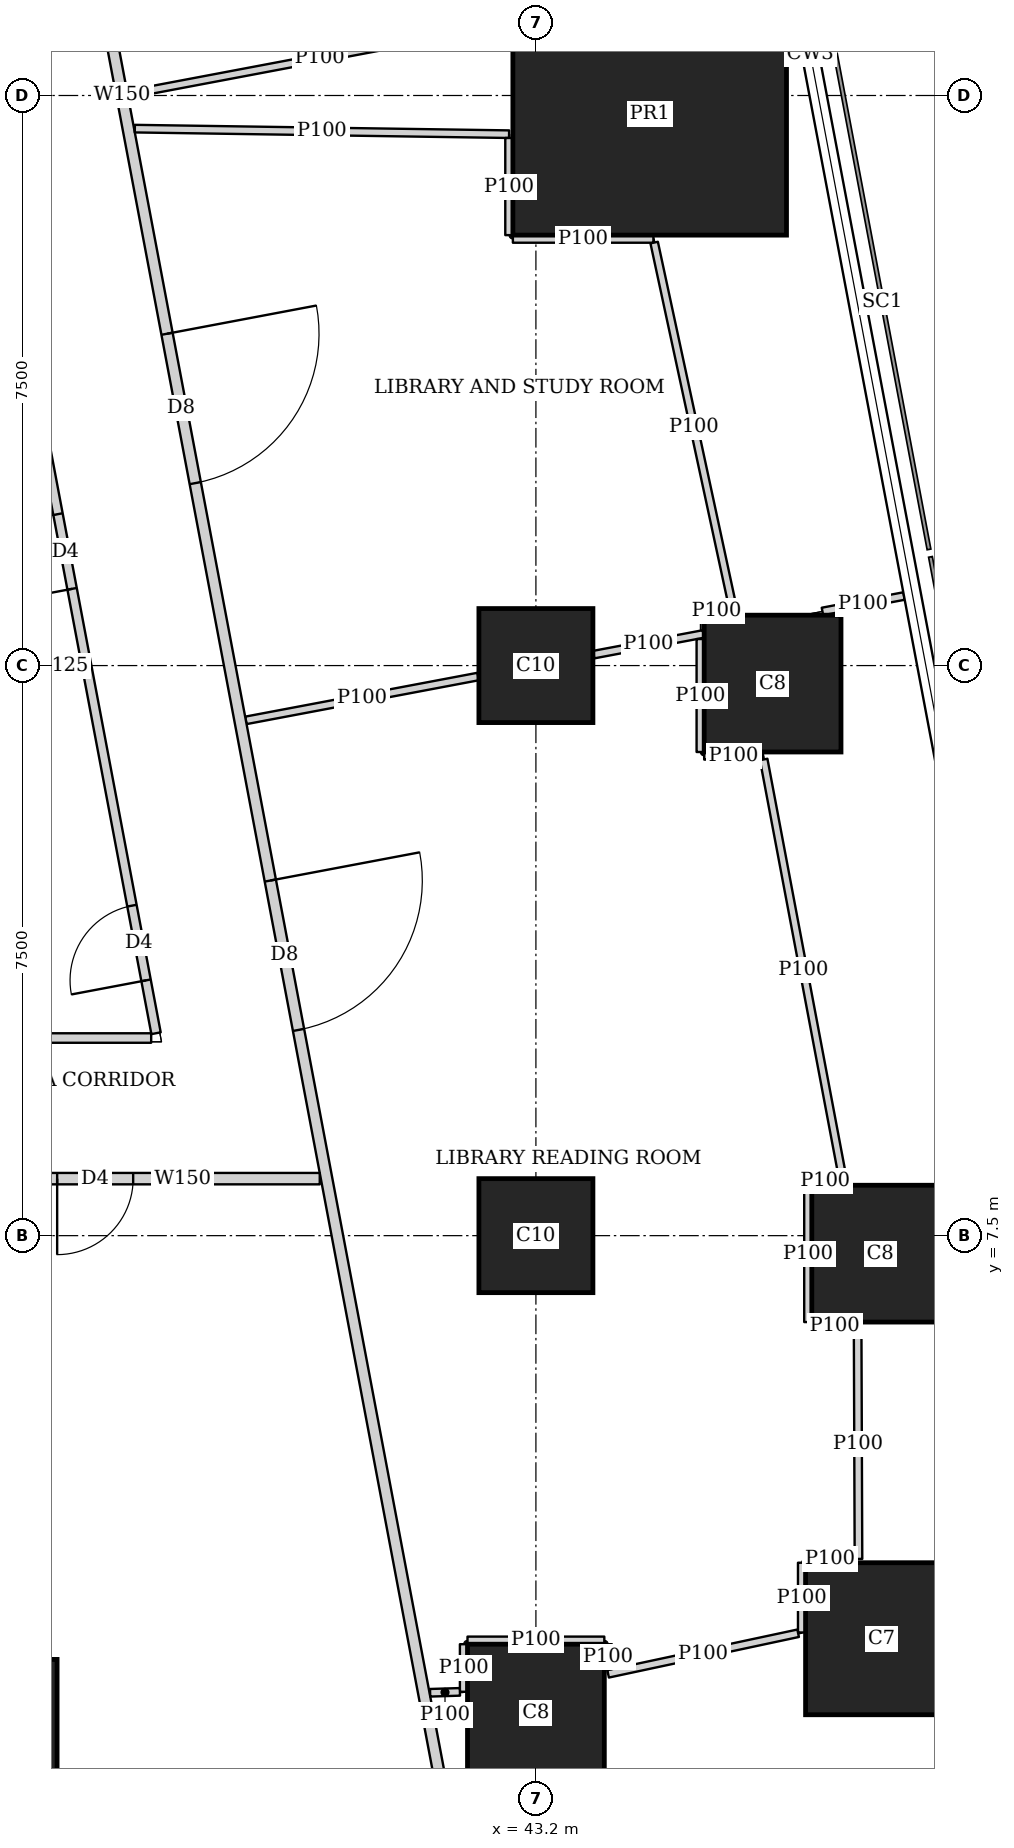
"""IFC4 building model, lengths in metres.
Left out: names, types, materials, properties, quantities, classifications, styles, units other than length and angle.
Written with IfcOpenShell. Run it as: python <this file> out.ifc"""

import sys

from ifc_helpers import new_model, si_unit, direction, frame, frame_2d, origin, origin_2d, place, context, subcontext, project, spatial, rectangle, extrude, element, fill, save


model = new_model("IFC4")
c1 = context("Model", 3, precision=1e-05, world=origin(), true_north=direction((0.0, 1.0)))
c2 = subcontext(c1, "Body", "Model", "MODEL_VIEW")
j1 = project(units=[si_unit("LENGTHUNIT", "METRE"), si_unit("PLANEANGLEUNIT", "RADIAN")], contexts=[c1])
p1 = place(None, origin())
s1 = spatial("IfcSite", under=j1, at=p1, CompositionType="ELEMENT")
p2 = place(p1, origin())
s2 = spatial("IfcBuilding", under=s1, at=p2, CompositionType="ELEMENT")
p3 = place(p2, frame((0.0, 0.0, 188.3)))
s3 = spatial("IfcBuildingStorey", under=s2, at=p3, CompositionType="ELEMENT", Elevation=188.3)
for number, where, z_axis, x_axis in (
    (1, (36.0, 1.025, 0.0), (0.0, 0.0, 1.0), (1.0, 0.0, 0.0)),
    (2, (43.2, 1.225, 0.0), (0.0, 0.0, 1.0), (1.0, 0.0, 0.0)),
):
    element("IfcColumn", number, at=place(p3, frame(where, z_axis=z_axis, x_axis=x_axis)), inside=s3, PredefinedType="COLUMN", context=c2, shape_type="SweptSolid", body=[
        extrude(rectangle(XDim=1.8, YDim=1.8, at=origin_2d()), origin(), (0.0, 0.0, 1.0), 5.4),
    ])
p4 = place(p3, frame((47.748, 2.197, 0.0), z_axis=(0.0, 0.0, 1.0), x_axis=(1.0, 0.0, 0.0)))
e3 = element("IfcColumn", 3, at=p4, inside=s3, PredefinedType="COLUMN", context=c2, shape_type="SweptSolid", body=[
    extrude(rectangle(XDim=2.0, YDim=2.0, at=origin_2d()), origin(), (0.0, 0.0, 1.0), 5.4),
])
p5 = place(p3, frame((43.2, 7.5, 0.0), z_axis=(0.0, 0.0, 1.0), x_axis=(1.0, 0.0, 0.0)))
e4 = element("IfcColumn", 4, at=p5, inside=s3, PredefinedType="COLUMN", context=c2, shape_type="SweptSolid", body=[
    extrude(rectangle(XDim=1.5, YDim=1.5, at=origin_2d()), origin(), (0.0, 0.0, 1.0), 5.4),
])
p6 = place(p3, frame((47.73, 7.263, 0.0), z_axis=(0.0, 0.0, 1.0), x_axis=(1.0, 0.0, 0.0)))
e5 = element("IfcColumn", 5, at=p6, inside=s3, PredefinedType="COLUMN", context=c2, shape_type="SweptSolid", body=[
    extrude(rectangle(XDim=1.8, YDim=1.8, at=origin_2d()), origin(), (0.0, 0.0, 1.0), 5.4),
])
p7 = place(p3, frame((43.2, 15.0, 0.0), z_axis=(0.0, 0.0, 1.0), x_axis=(1.0, 0.0, 0.0)))
e6 = element("IfcColumn", 6, at=p7, inside=s3, PredefinedType="COLUMN", context=c2, shape_type="SweptSolid", body=[
    extrude(rectangle(XDim=1.5, YDim=1.5, at=origin_2d()), origin(), (0.0, 0.0, 1.0), 5.4),
])
p8 = place(p3, frame((46.314, 14.763, 0.0), z_axis=(0.0, 0.0, 1.0), x_axis=(1.0, 0.0, 0.0)))
e7 = element("IfcColumn", 7, at=p8, inside=s3, PredefinedType="COLUMN", context=c2, shape_type="SweptSolid", body=[
    extrude(rectangle(XDim=1.8, YDim=1.8, at=origin_2d()), origin(), (0.0, 0.0, 1.0), 5.4),
])
p9 = place(p3, frame((44.697, 22.263, 0.0), z_axis=(0.0, 0.0, 1.0), x_axis=(1.0, 0.0, 0.0)))
e8 = element("IfcColumn", 8, at=p9, inside=s3, PredefinedType="COLUMN", context=c2, shape_type="SweptSolid", body=[
    extrude(rectangle(XDim=3.6, YDim=3.2, at=origin_2d()), origin(), (0.0, 0.0, 1.0), 5.4),
])
p10 = place(p3, frame((40.356, 8.25, 0.0), z_axis=(0.0, 0.0, 1.0), x_axis=(-1.0, 0.0, 0.0)))
e9 = element("IfcWall", 9, at=p10, inside=s3, PredefinedType="SOLIDWALL", context=c2, shape_type="SweptSolid", body=[
    extrude(rectangle(XDim=3.605, YDim=0.15, at=frame_2d((1.802, 0.0))), origin(), (0.0, 0.0, 1.0), 3.55),
])
p11 = place(p10, frame((2.455, 0.0, 0.0)))
e10 = element("IfcOpeningElement", 10, at=p11, cuts=e9, PredefinedType="OPENING", context=c2, shape_type="SweptSolid", body=[
    extrude(rectangle(XDim=1.0, YDim=2.1, at=frame_2d((0.5, 1.05))), frame((0.0, 0.085, 0.0), z_axis=(0.0, -1.0, 0.0), x_axis=(1.0, 0.0, 0.0)), (0.0, 0.0, 1.0), 0.17),
])
p12 = place(p3, frame((33.384, 45.638, 0.0), z_axis=(0.0, 0.0, 1.0), x_axis=(0.185609889355, -0.982623513342, 0.0)))
e11 = element("IfcWall", 11, at=p12, inside=s3, PredefinedType="SOLIDWALL", context=c2, shape_type="SweptSolid", body=[
    extrude(rectangle(XDim=47.093, YDim=0.15, at=frame_2d((23.547, 0.0))), origin(), (0.0, 0.0, 1.0), 3.35),
])
p13 = place(p12, frame((11.166, 0.0, 0.0)))
e12 = element("IfcOpeningElement", 12, at=p13, cuts=e11, PredefinedType="OPENING", context=c2, shape_type="SweptSolid", body=[
    extrude(rectangle(XDim=1.0, YDim=2.1, at=frame_2d((0.5, 1.05))), frame((0.0, 0.085, 0.0), z_axis=(0.0, -1.0, 0.0), x_axis=(1.0, 0.0, 0.0)), (0.0, 0.0, 1.0), 0.17),
])
p14 = place(p12, frame((26.737, 0.0, 0.0)))
e13 = element("IfcOpeningElement", 13, at=p14, cuts=e11, PredefinedType="OPENING", context=c2, shape_type="SweptSolid", body=[
    extrude(rectangle(XDim=2.0, YDim=2.1, at=frame_2d((1.0, 1.05))), frame((0.0, 0.085, 0.0), z_axis=(0.0, -1.0, 0.0), x_axis=(1.0, 0.0, 0.0)), (0.0, 0.0, 1.0), 0.17),
])
p15 = place(p12, frame((34.058, 0.0, 0.0)))
e14 = element("IfcOpeningElement", 14, at=p15, cuts=e11, PredefinedType="OPENING", context=c2, shape_type="SweptSolid", body=[
    extrude(rectangle(XDim=2.0, YDim=2.1, at=frame_2d((1.0, 1.05))), frame((0.0, 0.085, 0.0), z_axis=(0.0, -1.0, 0.0), x_axis=(1.0, 0.0, 0.0)), (0.0, 0.0, 1.0), 0.17),
])
p16 = place(p3, frame((42.887, 23.47, 0.0), z_axis=(0.0, 0.0, 1.0), x_axis=(-0.982608146753, -0.185691222019, 0.0)))
e15 = element("IfcWall", 15, at=p16, inside=s3, PredefinedType="PARTITIONING", context=c2, shape_type="SweptSolid", body=[
    extrude(rectangle(XDim=5.149, YDim=0.1, at=frame_2d((2.574, 0.0))), origin(), (0.0, 0.0, 1.0), 3.55),
])
p17 = place(p3, frame((48.043, 15.915, 0.0), z_axis=(0.0, 0.0, 1.0), x_axis=(-0.982549270777, -0.186002501317, 0.0)))
e16 = element("IfcWall", 16, at=p17, inside=s3, PredefinedType="PARTITIONING", context=c2, shape_type="SweptSolid", body=[
    extrude(rectangle(XDim=1.092, YDim=0.1, at=frame_2d((0.546, 0.0))), origin(), (0.0, 0.0, 1.0), 3.35),
])
p18 = place(p3, frame((45.404, 15.416, 0.0), z_axis=(0.0, 0.0, 1.0), x_axis=(-0.982723281097, -0.185080935781, 0.0)))
e17 = element("IfcWall", 17, at=p18, inside=s3, PredefinedType="PARTITIONING", context=c2, shape_type="SweptSolid", body=[
    extrude(rectangle(XDim=1.469, YDim=0.1, at=frame_2d((0.735, 0.0))), origin(), (0.0, 0.0, 1.0), 3.15),
])
p19 = place(p3, frame((42.44, 14.856, 0.0), z_axis=(0.0, 0.0, 1.0), x_axis=(-0.982643027883, -0.185506549084, 0.0)))
e18 = element("IfcWall", 18, at=p19, inside=s3, PredefinedType="PARTITIONING", context=c2, shape_type="SweptSolid", body=[
    extrude(rectangle(XDim=3.11, YDim=0.1, at=frame_2d((1.555, 0.0))), origin(), (0.0, 0.0, 1.0), 3.15),
])
p20 = place(p3, frame((28.95, 10.1, 0.0), z_axis=(0.0, 0.0, 1.0), x_axis=(1.0, 0.0, 0.0)))
e19 = element("IfcWall", 19, at=p20, inside=s3, PredefinedType="PARTITIONING", context=c2, shape_type="SweptSolid", body=[
    extrude(rectangle(XDim=9.188, YDim=0.125, at=frame_2d((4.594, 0.0))), origin(), (0.0, 0.0, 1.0), 3.15),
])
p21 = place(p3, frame((38.202, 10.163, 0.0), z_axis=(0.0, 0.0, 1.0), x_axis=(-0.185610321132, 0.982623431783, 0.0)))
e20 = element("IfcWall", 20, at=p21, inside=s3, PredefinedType="PARTITIONING", context=c2, shape_type="SweptSolid", body=[
    extrude(rectangle(XDim=25.111, YDim=0.125, at=frame_2d((12.556, 0.0))), origin(), (0.0, 0.0, 1.0), 3.55),
])
p22 = place(p21, frame((0.708, 0.0, 0.0)))
e21 = element("IfcOpeningElement", 21, at=p22, cuts=e20, PredefinedType="OPENING", context=c2, shape_type="SweptSolid", body=[
    extrude(rectangle(XDim=1.0, YDim=2.1, at=frame_2d((0.5, 1.05))), frame((0.0, 0.073, 0.0), z_axis=(0.0, -1.0, 0.0), x_axis=(1.0, 0.0, 0.0)), (0.0, 0.0, 1.0), 0.145),
])
p23 = place(p21, frame((5.95, 0.0, 0.0)))
e22 = element("IfcOpeningElement", 22, at=p23, cuts=e20, PredefinedType="OPENING", context=c2, shape_type="SweptSolid", body=[
    extrude(rectangle(XDim=1.0, YDim=2.1, at=frame_2d((0.5, 1.05))), frame((0.0, 0.073, 0.0), z_axis=(0.0, -1.0, 0.0), x_axis=(1.0, 0.0, 0.0)), (0.0, 0.0, 1.0), 0.145),
])
p24 = place(p21, frame((13.378, 0.0, 0.0)))
e23 = element("IfcOpeningElement", 23, at=p24, cuts=e20, PredefinedType="OPENING", context=c2, shape_type="SweptSolid", body=[
    extrude(rectangle(XDim=1.0, YDim=2.1, at=frame_2d((0.5, 1.05))), frame((0.0, 0.073, 0.0), z_axis=(0.0, -1.0, 0.0), x_axis=(1.0, 0.0, 0.0)), (0.0, 0.0, 1.0), 0.145),
])
p25 = place(p21, frame((21.2, 0.0, 0.0)))
e24 = element("IfcOpeningElement", 24, at=p25, cuts=e20, PredefinedType="OPENING", context=c2, shape_type="SweptSolid", body=[
    extrude(rectangle(XDim=1.0, YDim=2.1, at=frame_2d((0.5, 1.05))), frame((0.0, 0.073, 0.0), z_axis=(0.0, -1.0, 0.0), x_axis=(1.0, 0.0, 0.0)), (0.0, 0.0, 1.0), 0.145),
])
p26 = place(p3, frame((36.751, 15.0, 0.0), z_axis=(0.0, 0.0, 1.0), x_axis=(1.0, 0.0, 0.0)))
e25 = element("IfcWall", 25, at=p26, inside=s3, PredefinedType="PARTITIONING", context=c2, shape_type="SweptSolid", body=[
    extrude(rectangle(XDim=0.462, YDim=0.125, at=frame_2d((0.231, 0.0))), origin(), (0.0, 0.0, 1.0), 3.55),
])
p27 = place(p3, frame((37.923, 22.064, 0.0), z_axis=(0.0, 0.0, 1.0), x_axis=(0.99989012089, -0.014823837076, 0.0)))
e26 = element("IfcWall", 26, at=p27, inside=s3, PredefinedType="PARTITIONING", context=c2, shape_type="SweptSolid", body=[
    extrude(rectangle(XDim=4.924, YDim=0.1, at=frame_2d((2.462, 0.0))), origin(), (0.0, 0.0, 1.0), 3.55),
])
p28 = place(p3, frame((42.847, 21.941, 0.0), z_axis=(0.0, 0.0, 1.0), x_axis=(0.0, -1.0, 0.0)))
e27 = element("IfcWall", 27, at=p28, inside=s3, PredefinedType="PARTITIONING", context=c2, shape_type="SweptSolid", body=[
    extrude(rectangle(XDim=1.278, YDim=0.1, at=frame_2d((0.639, 0.0))), origin(), (0.0, 0.0, 1.0), 3.55),
])
p29 = place(p3, frame((42.897, 20.613, 0.0), z_axis=(0.0, 0.0, 1.0), x_axis=(1.0, 0.0, 0.0)))
e28 = element("IfcWall", 28, at=p29, inside=s3, PredefinedType="PARTITIONING", context=c2, shape_type="SweptSolid", body=[
    extrude(rectangle(XDim=1.849, YDim=0.1, at=frame_2d((0.925, 0.0))), origin(), (0.0, 0.0, 1.0), 3.35),
])
p30 = place(p3, frame((44.756, 20.565, 0.0), z_axis=(0.0, 0.0, 1.0), x_axis=(0.210718064905, -0.9775468772, 0.0)))
e29 = element("IfcWall", 29, at=p30, inside=s3, PredefinedType="PARTITIONING", context=c2, shape_type="SweptSolid", body=[
    extrude(rectangle(XDim=4.963, YDim=0.1, at=frame_2d((2.482, 0.0))), origin(), (0.0, 0.0, 1.0), 3.15),
])
p31 = place(p3, frame((45.74, 15.713, 0.0), z_axis=(0.0, 0.0, 1.0), x_axis=(-1.0, 0.0, 0.0)))
e30 = element("IfcWall", 30, at=p31, inside=s3, PredefinedType="PARTITIONING", context=c2, shape_type="SweptSolid", body=[
    extrude(rectangle(XDim=0.326, YDim=0.1, at=frame_2d((0.163, 0.0))), origin(), (0.0, 0.0, 1.0), 3.15),
])
p32 = place(p3, frame((45.364, 15.349, 0.0), z_axis=(0.0, 0.0, 1.0), x_axis=(0.0, -1.0, 0.0)))
e31 = element("IfcWall", 31, at=p32, inside=s3, PredefinedType="PARTITIONING", context=c2, shape_type="SweptSolid", body=[
    extrude(rectangle(XDim=1.486, YDim=0.1, at=frame_2d((0.743, 0.0))), origin(), (0.0, 0.0, 1.0), 3.15),
])
p33 = place(p3, frame((45.414, 13.813, 0.0), z_axis=(0.0, 0.0, 1.0), x_axis=(1.0, 0.0, 0.0)))
e32 = element("IfcWall", 32, at=p33, inside=s3, PredefinedType="PARTITIONING", context=c2, shape_type="SweptSolid", body=[
    extrude(rectangle(XDim=0.774, YDim=0.1, at=frame_2d((0.387, 0.0))), origin(), (0.0, 0.0, 1.0), 3.15),
])
p34 = place(p3, frame((46.197, 13.765, 0.0), z_axis=(0.0, 0.0, 1.0), x_axis=(0.185501542424, -0.982643973043, 0.0)))
e33 = element("IfcWall", 33, at=p34, inside=s3, PredefinedType="PARTITIONING", context=c2, shape_type="SweptSolid", body=[
    extrude(rectangle(XDim=5.65, YDim=0.1, at=frame_2d((2.825, 0.0))), origin(), (0.0, 0.0, 1.0), 3.35),
])
p35 = place(p3, frame((47.185, 8.213, 0.0), z_axis=(0.0, 0.0, 1.0), x_axis=(-1.0, 0.0, 0.0)))
e34 = element("IfcWall", 34, at=p35, inside=s3, PredefinedType="PARTITIONING", context=c2, shape_type="SweptSolid", body=[
    extrude(rectangle(XDim=0.355, YDim=0.1, at=frame_2d((0.177, 0.0))), origin(), (0.0, 0.0, 1.0), 3.35),
])
p36 = place(p3, frame((46.78, 8.163, 0.0), z_axis=(0.0, 0.0, 1.0), x_axis=(0.0, -1.0, 0.0)))
e35 = element("IfcWall", 35, at=p36, inside=s3, PredefinedType="PARTITIONING", context=c2, shape_type="SweptSolid", body=[
    extrude(rectangle(XDim=1.8, YDim=0.1, at=frame_2d((0.9, 0.0))), origin(), (0.0, 0.0, 1.0), 3.35),
])
p37 = place(p3, frame((46.83, 6.313, 0.0), z_axis=(0.0, 0.0, 1.0), x_axis=(1.0, 0.0, 0.0)))
e36 = element("IfcWall", 36, at=p37, inside=s3, PredefinedType="PARTITIONING", context=c2, shape_type="SweptSolid", body=[
    extrude(rectangle(XDim=0.603, YDim=0.1, at=frame_2d((0.302, 0.0))), origin(), (0.0, 0.0, 1.0), 3.35),
])
p38 = place(p3, frame((47.433, 6.263, 0.0), z_axis=(0.0, 0.0, 1.0), x_axis=(0.003642815625, -0.999993364925, 0.0)))
e37 = element("IfcWall", 37, at=p38, inside=s3, PredefinedType="PARTITIONING", context=c2, shape_type="SweptSolid", body=[
    extrude(rectangle(XDim=3.016, YDim=0.1, at=frame_2d((1.508, 0.0))), origin(), (0.0, 0.0, 1.0), 3.35),
])
p39 = place(p3, frame((47.394, 3.247, 0.0), z_axis=(0.0, 0.0, 1.0), x_axis=(-1.0, 0.0, 0.0)))
e38 = element("IfcWall", 38, at=p39, inside=s3, PredefinedType="PARTITIONING", context=c2, shape_type="SweptSolid", body=[
    extrude(rectangle(XDim=0.646, YDim=0.1, at=frame_2d((0.323, 0.0))), origin(), (0.0, 0.0, 1.0), 3.35),
])
p40 = place(p3, frame((46.698, 3.197, 0.0), z_axis=(0.0, 0.0, 1.0), x_axis=(0.0, -1.0, 0.0)))
e39 = element("IfcWall", 39, at=p40, inside=s3, PredefinedType="PARTITIONING", context=c2, shape_type="SweptSolid", body=[
    extrude(rectangle(XDim=0.918, YDim=0.1, at=frame_2d((0.459, 0.0))), origin(), (0.0, 0.0, 1.0), 3.35),
])
p41 = place(p3, frame((46.65, 2.269, 0.0), z_axis=(0.0, 0.0, 1.0), x_axis=(-0.977944742597, -0.208863784381, 0.0)))
e40 = element("IfcWall", 40, at=p41, inside=s3, PredefinedType="PARTITIONING", context=c2, shape_type="SweptSolid", body=[
    extrude(rectangle(XDim=2.556, YDim=0.1, at=frame_2d((1.278, 0.0))), origin(), (0.0, 0.0, 1.0), 3.35),
])
p42 = place(p3, frame((44.15, 1.797, 0.0), z_axis=(0.0, 0.0, 1.0), x_axis=(0.0, 1.0, 0.0)))
e41 = element("IfcWall", 41, at=p42, inside=s3, PredefinedType="PARTITIONING", context=c2, shape_type="SweptSolid", body=[
    extrude(rectangle(XDim=0.328, YDim=0.1, at=frame_2d((0.164, 0.0))), origin(), (0.0, 0.0, 1.0), 3.35),
])
p43 = place(p3, frame((44.1, 2.175, 0.0), z_axis=(0.0, 0.0, 1.0), x_axis=(-1.0, 0.0, 0.0)))
e42 = element("IfcWall", 42, at=p43, inside=s3, PredefinedType="PARTITIONING", context=c2, shape_type="SweptSolid", body=[
    extrude(rectangle(XDim=1.8, YDim=0.1, at=frame_2d((0.9, 0.0))), origin(), (0.0, 0.0, 1.0), 3.35),
])
p44 = place(p3, frame((42.25, 2.125, 0.0), z_axis=(0.0, 0.0, 1.0), x_axis=(0.0, -1.0, 0.0)))
e43 = element("IfcWall", 43, at=p44, inside=s3, PredefinedType="PARTITIONING", context=c2, shape_type="SweptSolid", body=[
    extrude(rectangle(XDim=0.626, YDim=0.1, at=frame_2d((0.313, 0.0))), origin(), (0.0, 0.0, 1.0), 3.35),
])
p45 = place(p3, frame((42.2, 1.498, 0.0), z_axis=(0.0, 0.0, 1.0), x_axis=(-0.999534297435, -0.030515377305, 0.0)))
e44 = element("IfcWall", 44, at=p45, inside=s3, PredefinedType="PARTITIONING", context=c2, shape_type="SweptSolid", body=[
    extrude(rectangle(XDim=0.392, YDim=0.1, at=frame_2d((0.196, 0.0))), origin(), (0.0, 0.0, 1.0), 3.35),
])
p46 = place(p11, origin())
e45 = element("IfcDoor", 45, at=p46, inside=s3, OperationType="SINGLE_SWING_RIGHT", PredefinedType="DOOR", context=c2, shape_type="SweptSolid", body=[
    extrude(rectangle(XDim=1.0, YDim=2.1, at=frame_2d((0.5, 1.05))), frame((0.0, 0.025, 0.0), z_axis=(0.0, -1.0, 0.0), x_axis=(1.0, 0.0, 0.0)), (0.0, 0.0, 1.0), 0.05),
])
fill(e10, e45)
p47 = place(p14, origin())
e46 = element("IfcDoor", 46, at=p47, inside=s3, OperationType="DOUBLE_DOOR_SINGLE_SWING", PredefinedType="DOOR", context=c2, shape_type="SweptSolid", body=[
    extrude(rectangle(XDim=2.0, YDim=2.1, at=frame_2d((1.0, 1.05))), frame((0.0, 0.025, 0.0), z_axis=(0.0, -1.0, 0.0), x_axis=(1.0, 0.0, 0.0)), (0.0, 0.0, 1.0), 0.05),
])
fill(e13, e46)
p48 = place(p15, origin())
e47 = element("IfcDoor", 47, at=p48, inside=s3, OperationType="DOUBLE_DOOR_SINGLE_SWING", PredefinedType="DOOR", context=c2, shape_type="SweptSolid", body=[
    extrude(rectangle(XDim=2.0, YDim=2.1, at=frame_2d((1.0, 1.05))), frame((0.0, 0.025, 0.0), z_axis=(0.0, -1.0, 0.0), x_axis=(1.0, 0.0, 0.0)), (0.0, 0.0, 1.0), 0.05),
])
fill(e14, e47)
p49 = place(p22, origin())
e48 = element("IfcDoor", 48, at=p49, inside=s3, OperationType="SINGLE_SWING_LEFT", PredefinedType="DOOR", context=c2, shape_type="SweptSolid", body=[
    extrude(rectangle(XDim=1.0, YDim=2.1, at=frame_2d((0.5, 1.05))), frame((0.0, 0.025, 0.0), z_axis=(0.0, -1.0, 0.0), x_axis=(1.0, 0.0, 0.0)), (0.0, 0.0, 1.0), 0.05),
])
fill(e21, e48)
p50 = place(p23, origin())
e49 = element("IfcDoor", 49, at=p50, inside=s3, OperationType="SINGLE_SWING_LEFT", PredefinedType="DOOR", context=c2, shape_type="SweptSolid", body=[
    extrude(rectangle(XDim=1.0, YDim=2.1, at=frame_2d((0.5, 1.05))), frame((0.0, 0.025, 0.0), z_axis=(0.0, -1.0, 0.0), x_axis=(1.0, 0.0, 0.0)), (0.0, 0.0, 1.0), 0.05),
])
fill(e22, e49)
save(model, sys.argv[1])
